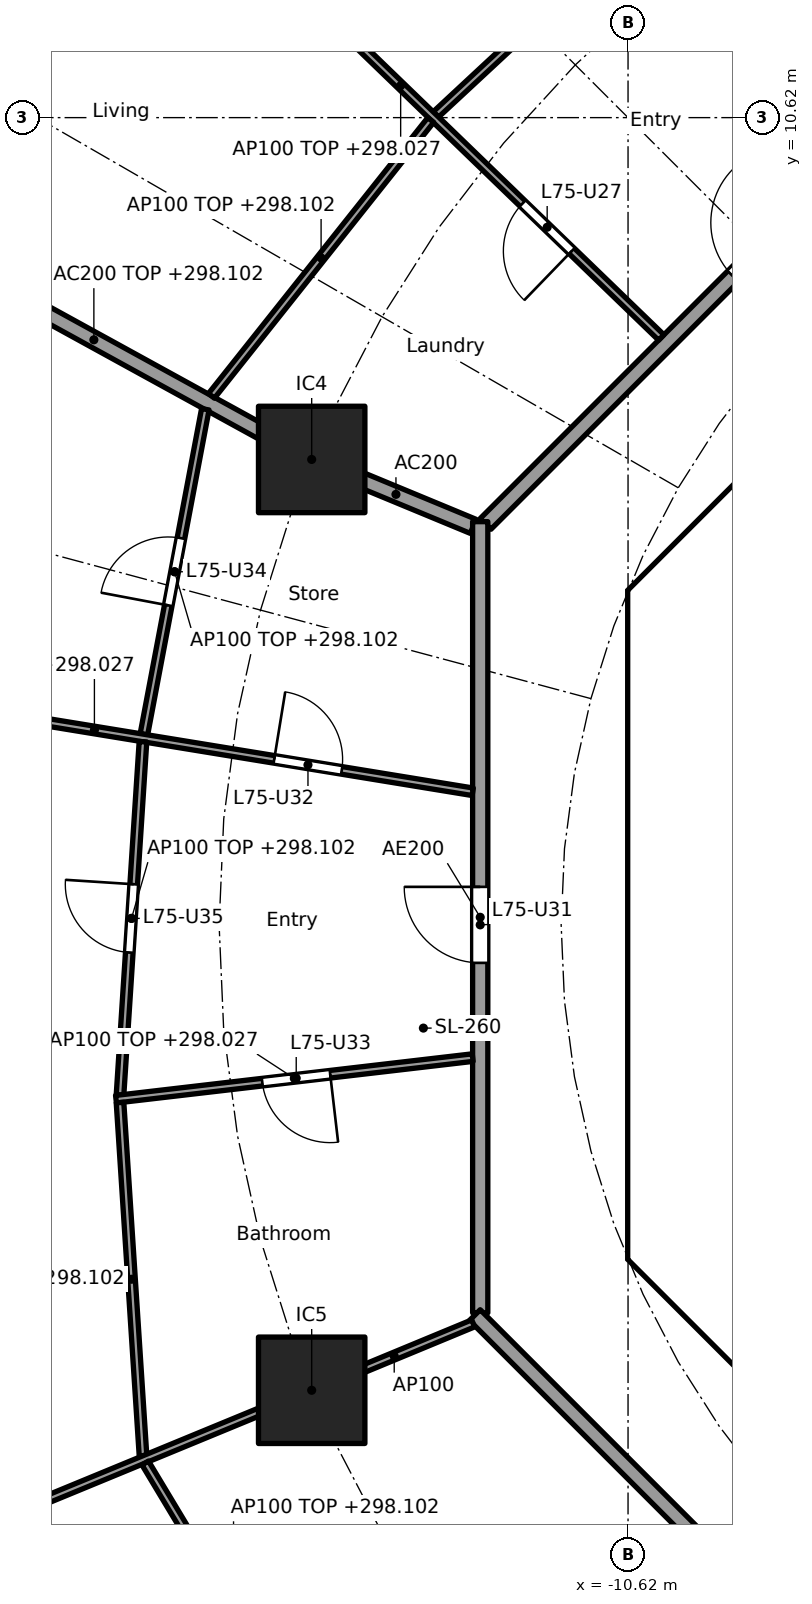
"""IFC4 building model, lengths in metres.
Left out: names, types, materials, properties, quantities, classifications, styles, units other than length and angle.
Written with IfcOpenShell. Run it as: python <this file> out.ifc"""

import sys

from ifc_helpers import new_model, si_unit, direction, frame, frame_2d, origin, origin_2d, place, context, subcontext, project, spatial, polyline, rectangle, outline, extrude, element, fill, save


model = new_model("IFC4")
c1 = context("Model", 3, precision=1e-05, world=origin(), true_north=direction((0.0, 1.0)))
c2 = subcontext(c1, "Body", "Model", "MODEL_VIEW")
j1 = project(units=[si_unit("LENGTHUNIT", "METRE"), si_unit("PLANEANGLEUNIT", "RADIAN")], contexts=[c1])
p1 = place(None, origin())
s1 = spatial("IfcSite", under=j1, at=p1, CompositionType="ELEMENT")
p2 = place(p1, origin())
s2 = spatial("IfcBuilding", under=s1, at=p2, CompositionType="ELEMENT")
p3 = place(p2, frame((0.0, 0.0, 295.5)))
s3 = spatial("IfcBuildingStorey", under=s2, at=p3, CompositionType="ELEMENT", Elevation=295.5)
for number, where, z_axis, x_axis in (
    (1, (-14.782, 6.123, 0.0), (0.0, 0.0, 1.0), (1.0, 0.0, 0.0)),
    (2, (-14.782, -6.123, 0.0), (0.0, 0.0, 1.0), (1.0, 0.0, 0.0)),
):
    element("IfcColumn", number, at=place(p3, frame(where, z_axis=z_axis, x_axis=x_axis)), inside=s3, PredefinedType="COLUMN", context=c2, shape_type="SweptSolid", body=[
        extrude(rectangle(XDim=1.4, YDim=1.4, at=origin_2d()), origin(), (0.0, 0.0, 1.0), 3.7),
    ])
p4 = place(p3, frame((-4.613, 9.988, 0.0), z_axis=(0.0, 0.0, 1.0), x_axis=(-0.707106781187, -0.707106781187, 0.0)))
e3 = element("IfcWall", 3, at=p4, inside=s3, PredefinedType="SHEAR", context=c2, shape_type="SweptSolid", body=[
    extrude(rectangle(XDim=7.602, YDim=0.6, at=frame_2d((3.801, 0.0))), origin(), (0.0, 0.0, 1.0), 3.28),
])
p5 = place(p4, frame((0.351, 0.0, 0.0)))
e4 = element("IfcOpeningElement", 4, at=p5, cuts=e3, PredefinedType="OPENING", context=c2, shape_type="SweptSolid", body=[
    extrude(rectangle(XDim=1.1, YDim=2.1, at=frame_2d((0.55, 1.05))), frame((0.0, 0.31, 0.0), z_axis=(0.0, -1.0, 0.0), x_axis=(1.0, 0.0, 0.0)), (0.0, 0.0, 1.0), 0.62),
])
p6 = place(p3, frame((-10.325, 3.801, 0.0), z_axis=(0.0, 0.0, 1.0), x_axis=(0.0, -1.0, 0.0)))
e5 = element("IfcWall", 5, at=p6, inside=s3, PredefinedType="SHEAR", context=c2, shape_type="SweptSolid", body=[
    extrude(rectangle(XDim=7.602, YDim=0.6, at=frame_2d((3.801, 0.0))), origin(), (0.0, 0.0, 1.0), 3.28),
])
p7 = place(p6, frame((0.651, 0.0, 0.0)))
e6 = element("IfcOpeningElement", 6, at=p7, cuts=e5, PredefinedType="OPENING", context=c2, shape_type="SweptSolid", body=[
    extrude(rectangle(XDim=1.5, YDim=2.1, at=frame_2d((0.75, 1.05))), frame((0.0, 0.31, 0.0), z_axis=(0.0, -1.0, 0.0), x_axis=(1.0, 0.0, 0.0)), (0.0, 0.0, 1.0), 0.62),
])
p8 = place(p6, frame((5.451, 0.0, 0.0)))
e7 = element("IfcOpeningElement", 7, at=p8, cuts=e5, PredefinedType="OPENING", context=c2, shape_type="SweptSolid", body=[
    extrude(rectangle(XDim=1.5, YDim=2.1, at=frame_2d((0.75, 1.05))), frame((0.0, 0.31, 0.0), z_axis=(0.0, -1.0, 0.0), x_axis=(1.0, 0.0, 0.0)), (0.0, 0.0, 1.0), 0.62),
])
p9 = place(p3, frame((-9.988, -4.613, 0.0), z_axis=(0.0, 0.0, 1.0), x_axis=(0.707106781187, -0.707106781187, 0.0)))
e8 = element("IfcWall", 8, at=p9, inside=s3, PredefinedType="SHEAR", context=c2, shape_type="SweptSolid", body=[
    extrude(rectangle(XDim=7.602, YDim=0.6, at=frame_2d((3.801, 0.0))), origin(), (0.0, 0.0, 1.0), 3.28),
])
p10 = place(p9, frame((6.151, 0.0, 0.0)))
e9 = element("IfcOpeningElement", 9, at=p10, cuts=e8, PredefinedType="OPENING", context=c2, shape_type="SweptSolid", body=[
    extrude(rectangle(XDim=1.1, YDim=2.1, at=frame_2d((0.55, 1.05))), frame((0.0, 0.31, 0.0), z_axis=(0.0, -1.0, 0.0), x_axis=(1.0, 0.0, 0.0)), (0.0, 0.0, 1.0), 0.62),
])
p11 = place(p3, origin())
e10 = element("IfcWall", 10, at=p11, inside=s3, PredefinedType="SHEAR", context=c2, shape_type="SweptSolid", body=[
    extrude(outline(polyline([(-10.625, -3.801), (-10.025, -3.801), (-10.025, -4.152), (-9.776, -4.401), (-10.2, -4.825), (-10.625, -4.401), (-10.625, -3.801)])), origin(), (0.0, 0.0, 1.0), 3.28),
])
p12 = place(p3, origin())
e11 = element("IfcWall", 11, at=p12, inside=s3, PredefinedType="SHEAR", context=c2, shape_type="SweptSolid", body=[
    extrude(outline(polyline([(-10.2, 4.825), (-9.776, 4.401), (-10.025, 4.152), (-10.025, 3.801), (-10.625, 3.801), (-10.625, 4.401), (-10.2, 4.825)])), origin(), (0.0, 0.0, 1.0), 3.28),
])
for number, where, z_axis, x_axis in (
    (12, (-10.025, -4.0, 0.0), (0.0, 0.0, 1.0), (1.0, 0.0, 0.0)),
    (13, (-10.025, 4.0, 0.0), (0.0, 0.0, 1.0), (1.0, 0.0, 0.0)),
):
    element("IfcWall", number, at=place(p3, frame(where, z_axis=z_axis, x_axis=x_axis)), inside=s3, PredefinedType="PARTITIONING", context=c2, shape_type="SweptSolid", body=[
        extrude(rectangle(XDim=3.325, YDim=0.2, at=frame_2d((1.662, 0.0))), origin(), (0.0, 0.0, 1.0), 3.28),
    ])
p13 = place(p3, frame((-12.657, 5.243, 0.0), z_axis=(0.0, 0.0, 1.0), x_axis=(-0.923869415315, 0.382707856524, 0.0)))
e14 = element("IfcWall", 14, at=p13, inside=s3, PredefinedType="PARTITIONING", context=c2, shape_type="SweptSolid", body=[
    extrude(rectangle(XDim=2.2, YDim=0.2, at=frame_2d((1.1, 0.0))), origin(), (0.0, 0.0, 1.0), 3.28),
])
p14 = place(p3, frame((-14.826, 6.147, 0.0), z_axis=(0.0, 0.0, 1.0), x_axis=(-0.876484755865, 0.481429613481, 0.0)))
e15 = element("IfcWall", 15, at=p14, inside=s3, PredefinedType="PARTITIONING", context=c2, shape_type="SweptSolid", body=[
    extrude(rectangle(XDim=6.439, YDim=0.2, at=frame_2d((3.219, 0.0))), origin(), (0.0, 0.0, 1.0), 2.602),
])
p15 = place(p3, frame((-5.275, 12.494, 0.0), z_axis=(0.0, 0.0, 1.0), x_axis=(-0.707106781187, -0.707106781187, 0.0)))
e16 = element("IfcWall", 16, at=p15, inside=s3, PredefinedType="PARTITIONING", context=c2, shape_type="SweptSolid", body=[
    extrude(rectangle(XDim=10.209, YDim=0.2, at=frame_2d((5.104, 0.0))), origin(), (0.0, 0.0, 1.0), 3.28),
])
p16 = place(p15, frame((4.604, 0.0, 0.0)))
e17 = element("IfcOpeningElement", 17, at=p16, cuts=e16, PredefinedType="OPENING", context=c2, shape_type="SweptSolid", body=[
    extrude(rectangle(XDim=1.0, YDim=2.1, at=frame_2d((0.5, 1.05))), frame((0.0, 0.11, 0.0), z_axis=(0.0, -1.0, 0.0), x_axis=(1.0, 0.0, 0.0)), (0.0, 0.0, 1.0), 0.22),
])
p17 = place(p3, frame((-12.565, 5.304, 0.0), z_axis=(0.0, 0.0, 1.0), x_axis=(0.0, -1.0, 0.0)))
e18 = element("IfcWall", 18, at=p17, inside=s3, PredefinedType="PARTITIONING", context=c2, shape_type="SweptSolid", body=[
    extrude(rectangle(XDim=10.409, YDim=0.2, at=frame_2d((5.205, 0.0))), origin(), (0.0, 0.0, 1.0), 3.28),
])
p18 = place(p17, frame((4.804, 0.0, 0.0)))
e19 = element("IfcOpeningElement", 19, at=p18, cuts=e18, PredefinedType="OPENING", context=c2, shape_type="SweptSolid", body=[
    extrude(rectangle(XDim=1.0, YDim=2.1, at=frame_2d((0.5, 1.05))), frame((0.0, 0.11, 0.0), z_axis=(0.0, -1.0, 0.0), x_axis=(1.0, 0.0, 0.0)), (0.0, 0.0, 1.0), 0.22),
])
p19 = place(p3, frame((-12.635, -5.134, 0.0), z_axis=(0.0, 0.0, 1.0), x_axis=(0.707106781187, -0.707106781187, 0.0)))
e20 = element("IfcWall", 20, at=p19, inside=s3, PredefinedType="PARTITIONING", context=c2, shape_type="SweptSolid", body=[
    extrude(rectangle(XDim=10.609, YDim=0.2, at=frame_2d((5.305, 0.0))), origin(), (0.0, 0.0, 1.0), 3.28),
])
p20 = place(p3, frame((-7.709, 10.197, 0.0), z_axis=(0.0, 0.0, 1.0), x_axis=(-0.515516160663, 0.856879856278, 0.0)))
e21 = element("IfcWall", 21, at=p20, inside=s3, PredefinedType="PARTITIONING", context=c2, shape_type="SweptSolid", body=[
    extrude(rectangle(XDim=9.426, YDim=0.1, at=frame_2d((4.713, 0.0))), origin(), (0.0, 0.0, 1.0), 2.527),
])
p21 = place(p20, frame((1.615, 0.0, 0.0)))
e22 = element("IfcOpeningElement", 22, at=p21, cuts=e21, PredefinedType="OPENING", context=c2, shape_type="SweptSolid", body=[
    extrude(rectangle(XDim=0.9, YDim=2.1, at=frame_2d((0.45, 1.05))), frame((0.0, 0.06, 0.0), z_axis=(0.0, -1.0, 0.0), x_axis=(1.0, 0.0, 0.0)), (0.0, 0.0, 1.0), 0.12),
])
p22 = place(p20, frame((6.328, 0.0, 0.0)))
e23 = element("IfcOpeningElement", 23, at=p22, cuts=e21, PredefinedType="OPENING", context=c2, shape_type="SweptSolid", body=[
    extrude(rectangle(XDim=0.9, YDim=2.1, at=frame_2d((0.45, 1.05))), frame((0.0, 0.06, 0.0), z_axis=(0.0, -1.0, 0.0), x_axis=(1.0, 0.0, 0.0)), (0.0, 0.0, 1.0), 0.12),
])
p23 = place(p3, frame((-9.875, 13.702, 0.0), z_axis=(0.0, 0.0, 1.0), x_axis=(-0.732618266441, -0.680639754699, 0.0)))
e24 = element("IfcWall", 24, at=p23, inside=s3, PredefinedType="PARTITIONING", context=c2, shape_type="SweptSolid", body=[
    extrude(rectangle(XDim=4.467, YDim=0.1, at=frame_2d((2.233, 0.0))), origin(), (0.0, 0.0, 1.0), 2.602),
])
p24 = place(p23, frame((1.783, 0.0, 0.0)))
e25 = element("IfcOpeningElement", 25, at=p24, cuts=e24, PredefinedType="OPENING", context=c2, shape_type="SweptSolid", body=[
    extrude(rectangle(XDim=0.9, YDim=2.1, at=frame_2d((0.45, 1.05))), frame((0.0, 0.06, 0.0), z_axis=(0.0, -1.0, 0.0), x_axis=(1.0, 0.0, 0.0)), (0.0, 0.0, 1.0), 0.12),
])
p25 = place(p3, frame((-10.183, 7.727, 0.0), z_axis=(0.0, 0.0, 1.0), x_axis=(-0.719063433856, 0.694944442449, 0.0)))
e26 = element("IfcWall", 26, at=p25, inside=s3, PredefinedType="PARTITIONING", context=c2, shape_type="SweptSolid", body=[
    extrude(rectangle(XDim=9.535, YDim=0.1, at=frame_2d((4.768, 0.0))), origin(), (0.0, 0.0, 1.0), 2.527),
])
p26 = place(p25, frame((1.637, 0.0, 0.0)))
e27 = element("IfcOpeningElement", 27, at=p26, cuts=e26, PredefinedType="OPENING", context=c2, shape_type="SweptSolid", body=[
    extrude(rectangle(XDim=0.9, YDim=2.1, at=frame_2d((0.45, 1.05))), frame((0.0, 0.06, 0.0), z_axis=(0.0, -1.0, 0.0), x_axis=(1.0, 0.0, 0.0)), (0.0, 0.0, 1.0), 0.12),
])
p27 = place(p25, frame((6.405, 0.0, 0.0)))
e28 = element("IfcOpeningElement", 28, at=p27, cuts=e26, PredefinedType="OPENING", context=c2, shape_type="SweptSolid", body=[
    extrude(rectangle(XDim=0.9, YDim=2.1, at=frame_2d((0.45, 1.05))), frame((0.0, 0.06, 0.0), z_axis=(0.0, -1.0, 0.0), x_axis=(1.0, 0.0, 0.0)), (0.0, 0.0, 1.0), 0.12),
])
p28 = place(p3, frame((-13.216, 10.589, 0.0), z_axis=(0.0, 0.0, 1.0), x_axis=(-0.622251572882, -0.782817335045, 0.0)))
e29 = element("IfcWall", 29, at=p28, inside=s3, PredefinedType="PARTITIONING", context=c2, shape_type="SweptSolid", body=[
    extrude(rectangle(XDim=4.636, YDim=0.1, at=frame_2d((2.318, 0.0))), origin(), (0.0, 0.0, 1.0), 2.602),
])
p29 = place(p3, frame((-16.181, 6.783, 0.0), z_axis=(0.0, 0.0, 1.0), x_axis=(-0.185670583745, -0.982612046706, 0.0)))
e30 = element("IfcWall", 30, at=p29, inside=s3, PredefinedType="PARTITIONING", context=c2, shape_type="SweptSolid", body=[
    extrude(rectangle(XDim=4.351, YDim=0.1, at=frame_2d((2.176, 0.0))), origin(), (0.0, 0.0, 1.0), 2.602),
])
p30 = place(p29, frame((1.726, 0.0, 0.0)))
e31 = element("IfcOpeningElement", 31, at=p30, cuts=e30, PredefinedType="OPENING", context=c2, shape_type="SweptSolid", body=[
    extrude(rectangle(XDim=0.9, YDim=2.1, at=frame_2d((0.45, 1.05))), frame((0.0, 0.06, 0.0), z_axis=(0.0, -1.0, 0.0), x_axis=(1.0, 0.0, 0.0)), (0.0, 0.0, 1.0), 0.12),
])
p31 = place(p3, frame((-12.664, 1.751, 0.0), z_axis=(0.0, 0.0, 1.0), x_axis=(-0.986935394566, 0.161116501183, 0.0)))
e32 = element("IfcWall", 32, at=p31, inside=s3, PredefinedType="PARTITIONING", context=c2, shape_type="SweptSolid", body=[
    extrude(rectangle(XDim=10.086, YDim=0.1, at=frame_2d((5.043, 0.0))), origin(), (0.0, 0.0, 1.0), 2.527),
])
p32 = place(p31, frame((1.746, 0.0, 0.0)))
e33 = element("IfcOpeningElement", 33, at=p32, cuts=e32, PredefinedType="OPENING", context=c2, shape_type="SweptSolid", body=[
    extrude(rectangle(XDim=0.9, YDim=2.1, at=frame_2d((0.45, 1.05))), frame((0.0, 0.06, 0.0), z_axis=(0.0, -1.0, 0.0), x_axis=(1.0, 0.0, 0.0)), (0.0, 0.0, 1.0), 0.12),
])
p33 = place(p3, frame((-17.002, 2.409, 0.0), z_axis=(0.0, 0.0, 1.0), x_axis=(-0.064855550758, -0.997894662545, 0.0)))
e34 = element("IfcWall", 34, at=p33, inside=s3, PredefinedType="PARTITIONING", context=c2, shape_type="SweptSolid", body=[
    extrude(rectangle(XDim=4.656, YDim=0.1, at=frame_2d((2.328, 0.0))), origin(), (0.0, 0.0, 1.0), 2.602),
])
p34 = place(p33, frame((1.878, 0.0, 0.0)))
e35 = element("IfcOpeningElement", 35, at=p34, cuts=e34, PredefinedType="OPENING", context=c2, shape_type="SweptSolid", body=[
    extrude(rectangle(XDim=0.9, YDim=2.1, at=frame_2d((0.45, 1.05))), frame((0.0, 0.06, 0.0), z_axis=(0.0, -1.0, 0.0), x_axis=(1.0, 0.0, 0.0)), (0.0, 0.0, 1.0), 0.12),
])
p35 = place(p3, frame((-12.664, -1.746, 0.0), z_axis=(0.0, 0.0, 1.0), x_axis=(-0.993265121683, -0.115863704621, 0.0)))
e36 = element("IfcWall", 36, at=p35, inside=s3, PredefinedType="PARTITIONING", context=c2, shape_type="SweptSolid", body=[
    extrude(rectangle(XDim=4.724, YDim=0.1, at=frame_2d((2.362, 0.0))), origin(), (0.0, 0.0, 1.0), 2.527),
])
p36 = place(p35, frame((1.887, 0.0, 0.0)))
e37 = element("IfcOpeningElement", 37, at=p36, cuts=e36, PredefinedType="OPENING", context=c2, shape_type="SweptSolid", body=[
    extrude(rectangle(XDim=0.9, YDim=2.1, at=frame_2d((0.45, 1.05))), frame((0.0, 0.06, 0.0), z_axis=(0.0, -1.0, 0.0), x_axis=(1.0, 0.0, 0.0)), (0.0, 0.0, 1.0), 0.12),
])
p37 = place(p3, frame((-17.304, -2.338, 0.0), z_axis=(0.0, 0.0, 1.0), x_axis=(0.064981578354, -0.99788646372, 0.0)))
e38 = element("IfcWall", 38, at=p37, inside=s3, PredefinedType="PARTITIONING", context=c2, shape_type="SweptSolid", body=[
    extrude(rectangle(XDim=4.659, YDim=0.1, at=frame_2d((2.329, 0.0))), origin(), (0.0, 0.0, 1.0), 2.602),
])
p38 = place(p3, frame((-12.657, -5.243, 0.0), z_axis=(0.0, 0.0, 1.0), x_axis=(-0.923871314276, -0.382703272338, 0.0)))
e39 = element("IfcWall", 39, at=p38, inside=s3, PredefinedType="PARTITIONING", context=c2, shape_type="SweptSolid", body=[
    extrude(rectangle(XDim=2.249, YDim=0.1, at=frame_2d((1.125, 0.0))), origin(), (0.0, 0.0, 1.0), 3.28),
])
p39 = place(p3, frame((-14.828, -6.142, 0.0), z_axis=(0.0, 0.0, 1.0), x_axis=(-0.924478087429, -0.381235184451, 0.0)))
e40 = element("IfcWall", 40, at=p39, inside=s3, PredefinedType="PARTITIONING", context=c2, shape_type="SweptSolid", body=[
    extrude(rectangle(XDim=8.499, YDim=0.1, at=frame_2d((4.25, 0.0))), origin(), (0.0, 0.0, 1.0), 2.602),
])
p40 = place(p39, frame((4.973, 0.0, 0.0)))
e41 = element("IfcOpeningElement", 41, at=p40, cuts=e40, PredefinedType="OPENING", context=c2, shape_type="SweptSolid", body=[
    extrude(rectangle(XDim=0.9, YDim=2.1, at=frame_2d((0.45, 1.05))), frame((0.0, 0.06, 0.0), z_axis=(0.0, -1.0, 0.0), x_axis=(1.0, 0.0, 0.0)), (0.0, 0.0, 1.0), 0.12),
])
p41 = place(p3, frame((-16.972, -7.08, 0.0), z_axis=(0.0, 0.0, 1.0), x_axis=(0.514989049311, -0.857196756346, 0.0)))
e42 = element("IfcWall", 42, at=p41, inside=s3, PredefinedType="PARTITIONING", context=c2, shape_type="SweptSolid", body=[
    extrude(rectangle(XDim=4.512, YDim=0.1, at=frame_2d((2.256, 0.0))), origin(), (0.0, 0.0, 1.0), 2.602),
])
p42 = place(p41, frame((1.806, 0.0, 0.0)))
e43 = element("IfcOpeningElement", 43, at=p42, cuts=e42, PredefinedType="OPENING", context=c2, shape_type="SweptSolid", body=[
    extrude(rectangle(XDim=0.9, YDim=2.1, at=frame_2d((0.45, 1.05))), frame((0.0, 0.06, 0.0), z_axis=(0.0, -1.0, 0.0), x_axis=(1.0, 0.0, 0.0)), (0.0, 0.0, 1.0), 0.12),
])
p43 = place(p7, origin())
e44 = element("IfcDoor", 44, at=p43, inside=s3, OperationType="DOUBLE_DOOR_SINGLE_SWING", PredefinedType="DOOR", context=c2, shape_type="SweptSolid", body=[
    extrude(rectangle(XDim=1.5, YDim=2.1, at=frame_2d((0.75, 1.05))), frame((0.0, 0.025, 0.0), z_axis=(0.0, -1.0, 0.0), x_axis=(1.0, 0.0, 0.0)), (0.0, 0.0, 1.0), 0.05),
])
fill(e6, e44)
p44 = place(p8, origin())
e45 = element("IfcDoor", 45, at=p44, inside=s3, OperationType="DOUBLE_DOOR_SINGLE_SWING", PredefinedType="DOOR", context=c2, shape_type="SweptSolid", body=[
    extrude(rectangle(XDim=1.5, YDim=2.1, at=frame_2d((0.75, 1.05))), frame((0.0, 0.025, 0.0), z_axis=(0.0, -1.0, 0.0), x_axis=(1.0, 0.0, 0.0)), (0.0, 0.0, 1.0), 0.05),
])
fill(e7, e45)
p45 = place(p16, frame((1.0, 0.0, 0.0), x_axis=(-1.0, 0.0, 0.0)))
e46 = element("IfcDoor", 46, at=p45, inside=s3, OperationType="SINGLE_SWING_RIGHT", PredefinedType="DOOR", context=c2, shape_type="SweptSolid", body=[
    extrude(rectangle(XDim=1.0, YDim=2.1, at=frame_2d((0.5, 1.05))), frame((0.0, 0.025, 0.0), z_axis=(0.0, -1.0, 0.0), x_axis=(1.0, 0.0, 0.0)), (0.0, 0.0, 1.0), 0.05),
])
fill(e17, e46)
p46 = place(p26, origin())
e47 = element("IfcDoor", 47, at=p46, inside=s3, OperationType="SINGLE_SWING_LEFT", PredefinedType="DOOR", context=c2, shape_type="SweptSolid", body=[
    extrude(rectangle(XDim=0.9, YDim=2.1, at=frame_2d((0.45, 1.05))), frame((0.0, 0.025, 0.0), z_axis=(0.0, -1.0, 0.0), x_axis=(1.0, 0.0, 0.0)), (0.0, 0.0, 1.0), 0.05),
])
fill(e27, e47)
p47 = place(p18, frame((1.0, 0.0, 0.0), x_axis=(-1.0, 0.0, 0.0)))
e48 = element("IfcDoor", 48, at=p47, inside=s3, OperationType="SINGLE_SWING_RIGHT", PredefinedType="DOOR", context=c2, shape_type="SweptSolid", body=[
    extrude(rectangle(XDim=1.0, YDim=2.1, at=frame_2d((0.5, 1.05))), frame((0.0, 0.025, 0.0), z_axis=(0.0, -1.0, 0.0), x_axis=(1.0, 0.0, 0.0)), (0.0, 0.0, 1.0), 0.05),
])
fill(e19, e48)
p48 = place(p32, frame((0.9, 0.0, 0.0), x_axis=(-1.0, 0.0, 0.0)))
e49 = element("IfcDoor", 49, at=p48, inside=s3, OperationType="SINGLE_SWING_LEFT", PredefinedType="DOOR", context=c2, shape_type="SweptSolid", body=[
    extrude(rectangle(XDim=0.9, YDim=2.1, at=frame_2d((0.45, 1.05))), frame((0.0, 0.025, 0.0), z_axis=(0.0, -1.0, 0.0), x_axis=(1.0, 0.0, 0.0)), (0.0, 0.0, 1.0), 0.05),
])
fill(e33, e49)
p49 = place(p36, origin())
e50 = element("IfcDoor", 50, at=p49, inside=s3, OperationType="SINGLE_SWING_LEFT", PredefinedType="DOOR", context=c2, shape_type="SweptSolid", body=[
    extrude(rectangle(XDim=0.9, YDim=2.1, at=frame_2d((0.45, 1.05))), frame((0.0, 0.025, 0.0), z_axis=(0.0, -1.0, 0.0), x_axis=(1.0, 0.0, 0.0)), (0.0, 0.0, 1.0), 0.05),
])
fill(e37, e50)
p50 = place(p30, frame((0.9, 0.0, 0.0), x_axis=(-1.0, 0.0, 0.0)))
e51 = element("IfcDoor", 51, at=p50, inside=s3, OperationType="SINGLE_SWING_LEFT", PredefinedType="DOOR", context=c2, shape_type="SweptSolid", body=[
    extrude(rectangle(XDim=0.9, YDim=2.1, at=frame_2d((0.45, 1.05))), frame((0.0, 0.025, 0.0), z_axis=(0.0, -1.0, 0.0), x_axis=(1.0, 0.0, 0.0)), (0.0, 0.0, 1.0), 0.05),
])
fill(e31, e51)
p51 = place(p34, frame((0.9, 0.0, 0.0), x_axis=(-1.0, 0.0, 0.0)))
e52 = element("IfcDoor", 52, at=p51, inside=s3, OperationType="SINGLE_SWING_RIGHT", PredefinedType="DOOR", context=c2, shape_type="SweptSolid", body=[
    extrude(rectangle(XDim=0.9, YDim=2.1, at=frame_2d((0.45, 1.05))), frame((0.0, 0.025, 0.0), z_axis=(0.0, -1.0, 0.0), x_axis=(1.0, 0.0, 0.0)), (0.0, 0.0, 1.0), 0.05),
])
fill(e35, e52)
save(model, sys.argv[1])
